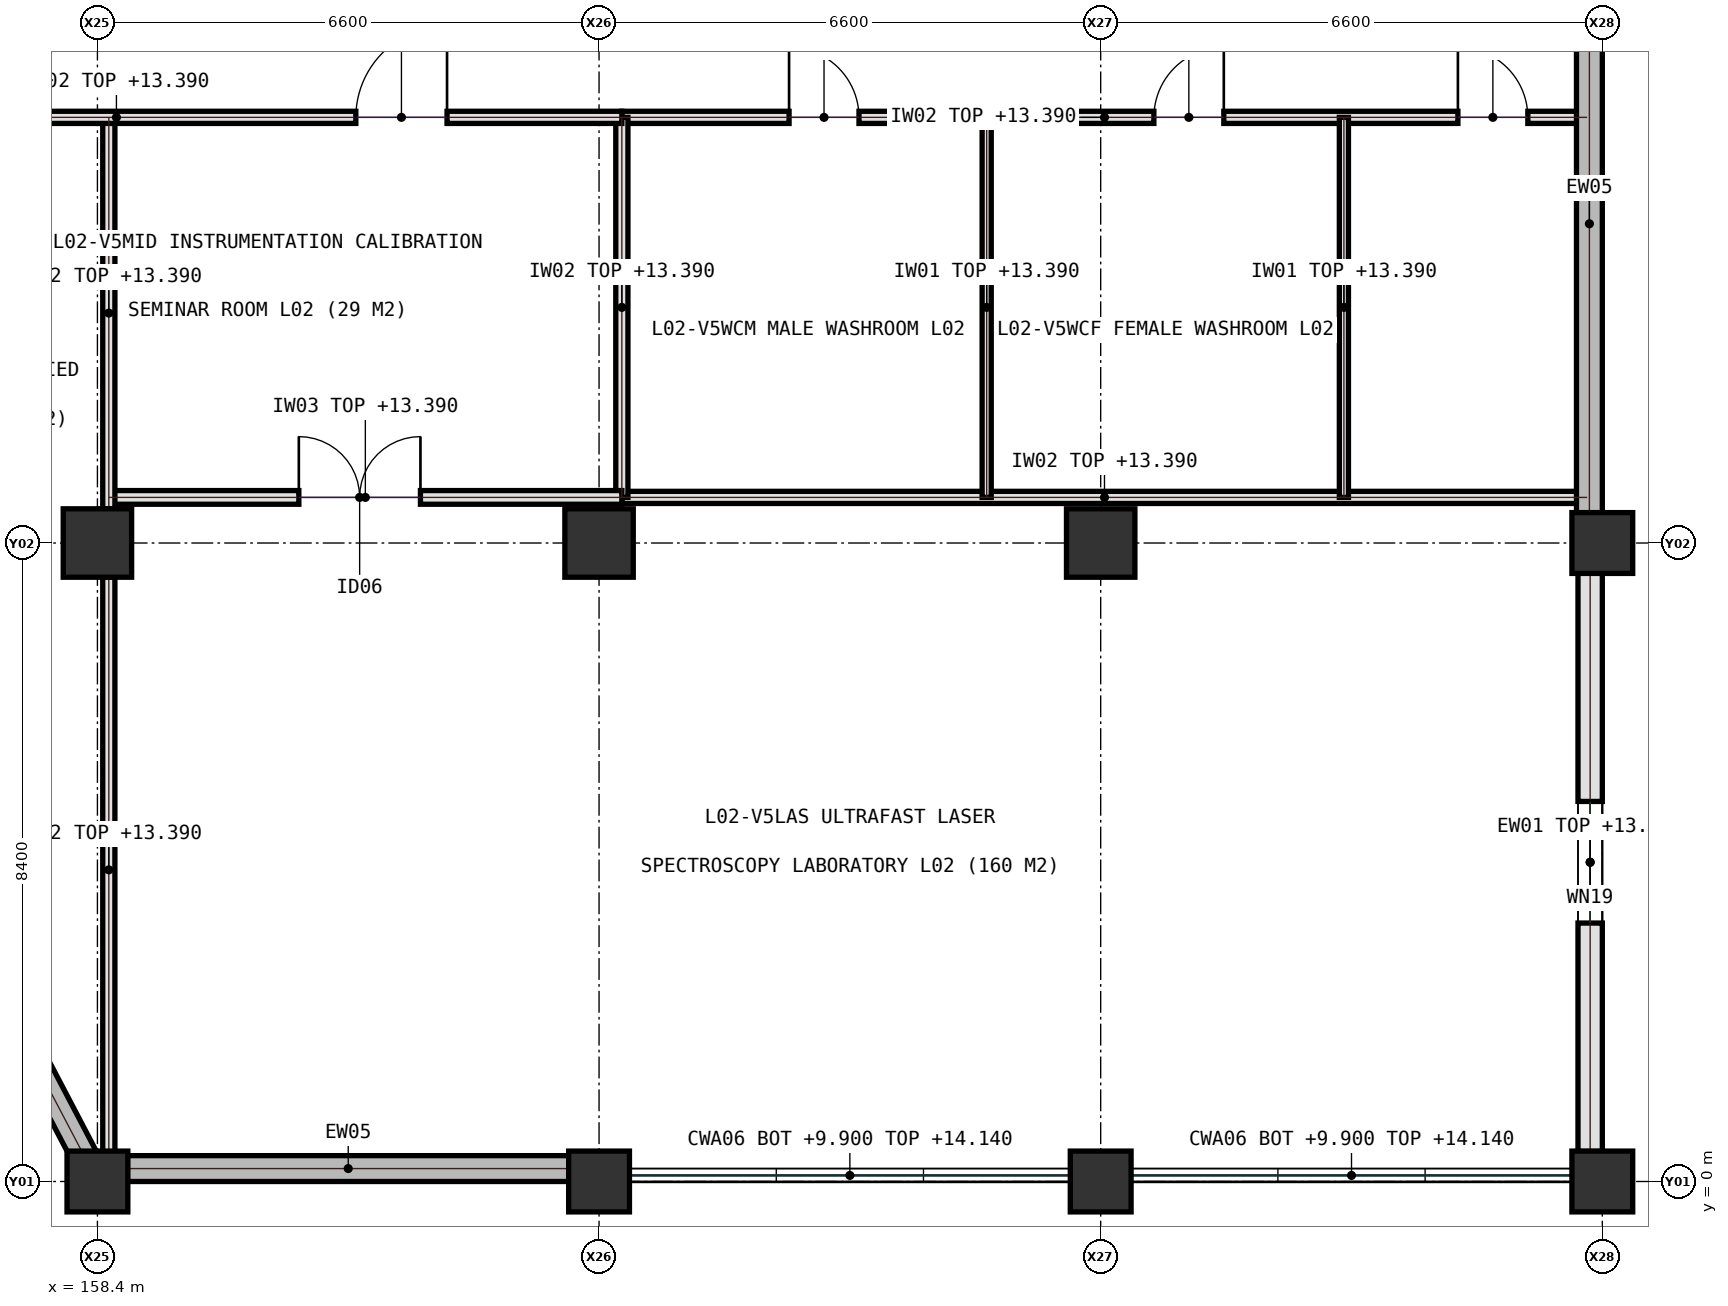
"""IFC4 building model, lengths in metres.
Left out: names, types, materials, properties, quantities, classifications, styles, units other than length and angle.
Written with IfcOpenShell. Run it as: python <this file> out.ifc"""

import sys

from ifc_helpers import new_model, si_unit, direction, frame, frame_2d, origin, origin_2d, place, context, subcontext, project, spatial, rectangle, extrude, element, fill, save


model = new_model("IFC4")
c1 = context("Model", 3, precision=1e-05, world=origin(), true_north=direction((0.0, 1.0)))
c2 = subcontext(c1, "Body", "Model", "MODEL_VIEW")
j1 = project(units=[si_unit("LENGTHUNIT", "METRE"), si_unit("PLANEANGLEUNIT", "RADIAN")], contexts=[c1])
p1 = place(None, origin())
s1 = spatial("IfcSite", under=j1, at=p1, CompositionType="ELEMENT")
p2 = place(p1, origin())
s2 = spatial("IfcBuilding", under=s1, at=p2, CompositionType="ELEMENT")
p3 = place(p2, frame((0.0, 0.0, 9.9)))
s3 = spatial("IfcBuildingStorey", under=s2, at=p3, CompositionType="ELEMENT", Elevation=9.9)
p4 = place(p3, frame((158.4, 0.0, 0.0), z_axis=(0.0, 0.0, 1.0), x_axis=(1.0, 0.0, 0.0)))
e1 = element("IfcColumn", 1, at=p4, inside=s3, PredefinedType="COLUMN", context=c2, shape_type="SweptSolid", body=[
    extrude(rectangle(XDim=0.8, YDim=0.8, at=origin_2d()), origin(), (0.0, 0.0, 1.0), 4.5),
])
p5 = place(p3, frame((158.4, 8.4, 0.0), z_axis=(0.0, 0.0, 1.0), x_axis=(1.0, 0.0, 0.0)))
e2 = element("IfcColumn", 2, at=p5, inside=s3, PredefinedType="COLUMN", context=c2, shape_type="SweptSolid", body=[
    extrude(rectangle(XDim=0.9, YDim=0.9, at=origin_2d()), origin(), (0.0, 0.0, 1.0), 4.5),
])
p6 = place(p3, frame((165.0, 0.0, 0.0), z_axis=(0.0, 0.0, 1.0), x_axis=(1.0, 0.0, 0.0)))
e3 = element("IfcColumn", 3, at=p6, inside=s3, PredefinedType="COLUMN", context=c2, shape_type="SweptSolid", body=[
    extrude(rectangle(XDim=0.8, YDim=0.8, at=origin_2d()), origin(), (0.0, 0.0, 1.0), 4.5),
])
p7 = place(p3, frame((165.0, 8.4, 0.0), z_axis=(0.0, 0.0, 1.0), x_axis=(1.0, 0.0, 0.0)))
e4 = element("IfcColumn", 4, at=p7, inside=s3, PredefinedType="COLUMN", context=c2, shape_type="SweptSolid", body=[
    extrude(rectangle(XDim=0.9, YDim=0.9, at=origin_2d()), origin(), (0.0, 0.0, 1.0), 4.5),
])
p8 = place(p3, frame((171.6, 0.0, 0.0), z_axis=(0.0, 0.0, 1.0), x_axis=(1.0, 0.0, 0.0)))
e5 = element("IfcColumn", 5, at=p8, inside=s3, PredefinedType="COLUMN", context=c2, shape_type="SweptSolid", body=[
    extrude(rectangle(XDim=0.8, YDim=0.8, at=origin_2d()), origin(), (0.0, 0.0, 1.0), 4.5),
])
p9 = place(p3, frame((171.6, 8.4, 0.0), z_axis=(0.0, 0.0, 1.0), x_axis=(1.0, 0.0, 0.0)))
e6 = element("IfcColumn", 6, at=p9, inside=s3, PredefinedType="COLUMN", context=c2, shape_type="SweptSolid", body=[
    extrude(rectangle(XDim=0.9, YDim=0.9, at=origin_2d()), origin(), (0.0, 0.0, 1.0), 4.5),
])
for number, where, z_axis, x_axis in (
    (7, (178.2, 0.0, 0.0), (0.0, 0.0, 1.0), (1.0, 0.0, 0.0)),
    (8, (178.2, 8.4, 0.0), (0.0, 0.0, 1.0), (1.0, 0.0, 0.0)),
):
    element("IfcColumn", number, at=place(p3, frame(where, z_axis=z_axis, x_axis=x_axis)), inside=s3, PredefinedType="COLUMN", context=c2, shape_type="SweptSolid", body=[
        extrude(rectangle(XDim=0.8, YDim=0.8, at=origin_2d()), origin(), (0.0, 0.0, 1.0), 4.5),
    ])
p10 = place(p3, frame((165.3, 14.0, 0.0), z_axis=(0.0, 0.0, 1.0), x_axis=(1.0, 0.0, 0.0)))
e9 = element("IfcWall", 9, at=p10, inside=s3, PredefinedType="PARTITIONING", context=c2, shape_type="SweptSolid", body=[
    extrude(rectangle(XDim=12.7, YDim=0.16, at=frame_2d((6.35, 0.0))), origin(), (0.0, 0.0, 1.0), 3.49),
])
p11 = place(p10, frame((2.2, 0.0, 0.0)))
e10 = element("IfcOpeningElement", 10, at=p11, cuts=e9, PredefinedType="OPENING", context=c2, shape_type="SweptSolid", body=[
    extrude(rectangle(XDim=0.92, YDim=2.08, at=frame_2d((0.46, 1.04))), frame((0.0, 0.09, 0.0), z_axis=(0.0, -1.0, 0.0), x_axis=(1.0, 0.0, 0.0)), (0.0, 0.0, 1.0), 0.18),
])
p12 = place(p10, frame((7.0, 0.0, 0.0)))
e11 = element("IfcOpeningElement", 11, at=p12, cuts=e9, PredefinedType="OPENING", context=c2, shape_type="SweptSolid", body=[
    extrude(rectangle(XDim=0.92, YDim=2.08, at=frame_2d((0.46, 1.04))), frame((0.0, 0.09, 0.0), z_axis=(0.0, -1.0, 0.0), x_axis=(1.0, 0.0, 0.0)), (0.0, 0.0, 1.0), 0.18),
])
p13 = place(p10, frame((11.0, 0.0, 0.0)))
e12 = element("IfcOpeningElement", 12, at=p13, cuts=e9, PredefinedType="OPENING", context=c2, shape_type="SweptSolid", body=[
    extrude(rectangle(XDim=0.92, YDim=2.08, at=frame_2d((0.46, 1.04))), frame((0.0, 0.09, 0.0), z_axis=(0.0, -1.0, 0.0), x_axis=(1.0, 0.0, 0.0)), (0.0, 0.0, 1.0), 0.18),
])
p14 = place(p3, frame((165.3, 9.0, 0.0), z_axis=(0.0, 0.0, 1.0), x_axis=(1.0, 0.0, 0.0)))
e13 = element("IfcWall", 13, at=p14, inside=s3, PredefinedType="PARTITIONING", context=c2, shape_type="SweptSolid", body=[
    extrude(rectangle(XDim=12.7, YDim=0.16, at=frame_2d((6.35, 0.0))), origin(), (0.0, 0.0, 1.0), 3.49),
])
p15 = place(p3, frame((165.3, 9.0, 0.0), z_axis=(0.0, 0.0, 1.0), x_axis=(0.0, 1.0, 0.0)))
e14 = element("IfcWall", 14, at=p15, inside=s3, PredefinedType="PARTITIONING", context=c2, shape_type="SweptSolid", body=[
    extrude(rectangle(XDim=5.0, YDim=0.16, at=frame_2d((2.5, 0.0))), origin(), (0.0, 0.0, 1.0), 3.49),
])
for number, where, z_axis, x_axis in (
    (15, (170.1, 9.0, 0.0), (0.0, 0.0, 1.0), (0.0, 1.0, 0.0)),
    (16, (174.8, 9.0, 0.0), (0.0, 0.0, 1.0), (0.0, 1.0, 0.0)),
):
    element("IfcWall", number, at=place(p3, frame(where, z_axis=z_axis, x_axis=x_axis)), inside=s3, PredefinedType="PARTITIONING", context=c2, shape_type="SweptSolid", body=[
        extrude(rectangle(XDim=5.0, YDim=0.12, at=frame_2d((2.5, 0.0))), origin(), (0.0, 0.0, 1.0), 3.49),
    ])
p16 = place(p3, frame((158.55, 9.0, 0.0), z_axis=(0.0, 0.0, 1.0), x_axis=(1.0, 0.0, 0.0)))
e17 = element("IfcWall", 17, at=p16, inside=s3, PredefinedType="SOLIDWALL", context=c2, shape_type="SweptSolid", body=[
    extrude(rectangle(XDim=6.75, YDim=0.18, at=frame_2d((3.375, 0.0))), origin(), (0.0, 0.0, 1.0), 3.49),
])
p17 = place(p16, frame((2.5, 0.0, 0.0)))
e18 = element("IfcOpeningElement", 18, at=p17, cuts=e17, PredefinedType="OPENING", context=c2, shape_type="SweptSolid", body=[
    extrude(rectangle(XDim=1.6, YDim=2.2, at=frame_2d((0.8, 1.1))), frame((0.0, 0.1, 0.0), z_axis=(0.0, -1.0, 0.0), x_axis=(1.0, 0.0, 0.0)), (0.0, 0.0, 1.0), 0.2),
])
p18 = place(p3, frame((158.55, 0.25, 0.0), z_axis=(0.0, 0.0, 1.0), x_axis=(0.0, 1.0, 0.0)))
e19 = element("IfcWall", 19, at=p18, inside=s3, PredefinedType="PARTITIONING", context=c2, shape_type="SweptSolid", body=[
    extrude(rectangle(XDim=7.7, YDim=0.16, at=frame_2d((3.85, 0.0))), origin(), (0.0, 0.0, 1.0), 3.49),
])
p19 = place(p3, frame((158.55, 8.85, 0.0), z_axis=(0.0, 0.0, 1.0), x_axis=(0.0, 1.0, 0.0)))
e20 = element("IfcWall", 20, at=p19, inside=s3, PredefinedType="PARTITIONING", context=c2, shape_type="SweptSolid", body=[
    extrude(rectangle(XDim=5.15, YDim=0.16, at=frame_2d((2.575, 0.0))), origin(), (0.0, 0.0, 1.0), 3.49),
])
p20 = place(p3, frame((152.0, 14.0, 0.0), z_axis=(0.0, 0.0, 1.0), x_axis=(1.0, 0.0, 0.0)))
e21 = element("IfcWall", 21, at=p20, inside=s3, PredefinedType="PARTITIONING", context=c2, shape_type="SweptSolid", body=[
    extrude(rectangle(XDim=13.3, YDim=0.16, at=frame_2d((6.65, 0.0))), origin(), (0.0, 0.0, 1.0), 3.49),
])
p21 = place(p20, frame((2.6, 0.0, 0.0)))
e22 = element("IfcOpeningElement", 22, at=p21, cuts=e21, PredefinedType="OPENING", context=c2, shape_type="SweptSolid", body=[
    extrude(rectangle(XDim=1.2, YDim=2.22, at=frame_2d((0.6, 1.11))), frame((0.0, 0.09, 0.0), z_axis=(0.0, -1.0, 0.0), x_axis=(1.0, 0.0, 0.0)), (0.0, 0.0, 1.0), 0.18),
])
p22 = place(p20, frame((9.8, 0.0, 0.0)))
e23 = element("IfcOpeningElement", 23, at=p22, cuts=e21, PredefinedType="OPENING", context=c2, shape_type="SweptSolid", body=[
    extrude(rectangle(XDim=1.2, YDim=2.22, at=frame_2d((0.6, 1.11))), frame((0.0, 0.09, 0.0), z_axis=(0.0, -1.0, 0.0), x_axis=(1.0, 0.0, 0.0)), (0.0, 0.0, 1.0), 0.18),
])
p23 = place(p3, frame((158.795, 0.17, 0.0), z_axis=(0.0, 0.0, 1.0), x_axis=(1.0, 0.0, 0.0)))
e24 = element("IfcWall", 24, at=p23, inside=s3, PredefinedType="SHEAR", context=c2, shape_type="SweptSolid", body=[
    extrude(rectangle(XDim=5.81, YDim=0.34, at=frame_2d((2.905, 0.0))), origin(), (0.0, 0.0, 1.0), 4.24),
])
p24 = place(p3, frame((178.04, 0.395, 0.0), z_axis=(0.0, 0.0, 1.0), x_axis=(0.0, 1.0, 0.0)))
e25 = element("IfcWall", 25, at=p24, inside=s3, PredefinedType="SOLIDWALL", context=c2, shape_type="SweptSolid", body=[
    extrude(rectangle(XDim=7.61, YDim=0.32, at=frame_2d((3.805, 0.0))), origin(), (0.0, 0.0, 1.0), 3.625),
])
p25 = place(p24, frame((3.005, 0.0, 0.95)))
e26 = element("IfcOpeningElement", 26, at=p25, cuts=e25, PredefinedType="OPENING", context=c2, shape_type="SweptSolid", body=[
    extrude(rectangle(XDim=1.6, YDim=1.85, at=frame_2d((0.8, 0.925))), frame((0.0, 0.17, 0.0), z_axis=(0.0, -1.0, 0.0), x_axis=(1.0, 0.0, 0.0)), (0.0, 0.0, 1.0), 0.34),
])
p26 = place(p3, frame((178.03, 8.795, 0.0), z_axis=(0.0, 0.0, 1.0), x_axis=(0.0, 1.0, 0.0)))
e27 = element("IfcWall", 27, at=p26, inside=s3, PredefinedType="SHEAR", context=c2, shape_type="SweptSolid", body=[
    extrude(rectangle(XDim=7.61, YDim=0.34, at=frame_2d((3.805, 0.0))), origin(), (0.0, 0.0, 1.0), 4.24),
])
p27 = place(p3, frame((155.25, 6.01, 0.0), z_axis=(0.0, 0.0, 1.0), x_axis=(0.464471613901, -0.885588007981, 0.0)))
e28 = element("IfcWall", 28, at=p27, inside=s3, PredefinedType="SHEAR", context=c2, shape_type="SweptSolid", body=[
    extrude(rectangle(XDim=6.459, YDim=0.34, at=frame_2d((3.229, 0.0))), origin(), (0.0, 0.0, 1.0), 4.24),
])
p28 = place(p11, origin())
e29 = element("IfcDoor", 29, at=p28, inside=s3, OperationType="SINGLE_SWING_LEFT", PredefinedType="DOOR", context=c2, shape_type="SweptSolid", body=[
    extrude(rectangle(XDim=0.92, YDim=2.08, at=frame_2d((0.46, 1.04))), frame((0.0, 0.025, 0.0), z_axis=(0.0, -1.0, 0.0), x_axis=(1.0, 0.0, 0.0)), (0.0, 0.0, 1.0), 0.05),
])
fill(e10, e29)
p29 = place(p12, origin())
e30 = element("IfcDoor", 30, at=p29, inside=s3, OperationType="SINGLE_SWING_RIGHT", PredefinedType="DOOR", context=c2, shape_type="SweptSolid", body=[
    extrude(rectangle(XDim=0.92, YDim=2.08, at=frame_2d((0.46, 1.04))), frame((0.0, 0.025, 0.0), z_axis=(0.0, -1.0, 0.0), x_axis=(1.0, 0.0, 0.0)), (0.0, 0.0, 1.0), 0.05),
])
fill(e11, e30)
p30 = place(p13, origin())
e31 = element("IfcDoor", 31, at=p30, inside=s3, OperationType="SINGLE_SWING_LEFT", PredefinedType="DOOR", context=c2, shape_type="SweptSolid", body=[
    extrude(rectangle(XDim=0.92, YDim=2.08, at=frame_2d((0.46, 1.04))), frame((0.0, 0.025, 0.0), z_axis=(0.0, -1.0, 0.0), x_axis=(1.0, 0.0, 0.0)), (0.0, 0.0, 1.0), 0.05),
])
fill(e12, e31)
p31 = place(p17, origin())
e32 = element("IfcDoor", 32, at=p31, inside=s3, OperationType="DOUBLE_DOOR_SINGLE_SWING", PredefinedType="DOOR", context=c2, shape_type="SweptSolid", body=[
    extrude(rectangle(XDim=1.6, YDim=2.2, at=frame_2d((0.8, 1.1))), frame((0.0, 0.025, 0.0), z_axis=(0.0, -1.0, 0.0), x_axis=(1.0, 0.0, 0.0)), (0.0, 0.0, 1.0), 0.05),
])
fill(e18, e32)
p32 = place(p22, origin())
e33 = element("IfcDoor", 33, at=p32, inside=s3, OperationType="SINGLE_SWING_RIGHT", PredefinedType="DOOR", context=c2, shape_type="SweptSolid", body=[
    extrude(rectangle(XDim=1.2, YDim=2.22, at=frame_2d((0.6, 1.11))), frame((0.0, 0.025, 0.0), z_axis=(0.0, -1.0, 0.0), x_axis=(1.0, 0.0, 0.0)), (0.0, 0.0, 1.0), 0.05),
])
fill(e23, e33)
p33 = place(p25, origin())
e34 = element("IfcWindow", 34, at=p33, inside=s3, PartitioningType="SINGLE_PANEL", PredefinedType="WINDOW", context=c2, shape_type="SweptSolid", body=[
    extrude(rectangle(XDim=1.6, YDim=1.85, at=frame_2d((0.8, 0.925))), frame((0.0, 0.03, 0.0), z_axis=(0.0, -1.0, 0.0), x_axis=(1.0, 0.0, 0.0)), (0.0, 0.0, 1.0), 0.06),
])
fill(e26, e34)
save(model, sys.argv[1])
